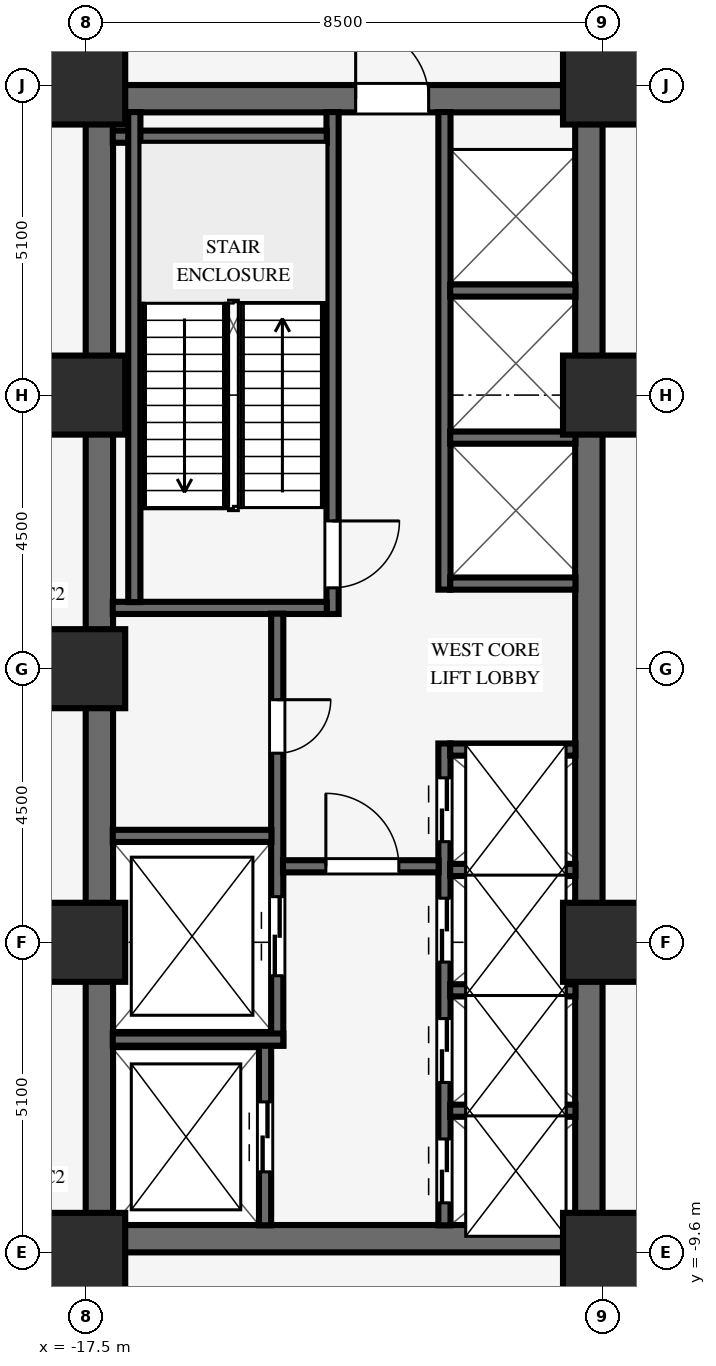
"""IFC4 building model, lengths in metres.
Left out: names, types, materials, properties, quantities, classifications, styles, units other than length and angle.
Written with IfcOpenShell. Run it as: python <this file> out.ifc"""

import sys

from ifc_helpers import new_model, si_unit, direction, frame, frame_2d, origin, origin_2d, place, context, subcontext, project, spatial, rectangle, extrude, source, transform, mapped, element, fill, save


model = new_model("IFC4")
c1 = context("Model", 3, precision=1e-05, world=origin(), true_north=direction((0.0, 1.0)))
c2 = subcontext(c1, "Body", "Model", "MODEL_VIEW")
j1 = project(units=[si_unit("LENGTHUNIT", "METRE"), si_unit("PLANEANGLEUNIT", "RADIAN")], contexts=[c1])
p1 = place(None, origin())
s1 = spatial("IfcSite", under=j1, at=p1, CompositionType="ELEMENT")
p2 = place(p1, origin())
s2 = spatial("IfcBuilding", under=s1, at=p2, CompositionType="ELEMENT")
p3 = place(p2, frame((0.0, 0.0, 9.2)))
s3 = spatial("IfcBuildingStorey", under=s2, at=p3, CompositionType="ELEMENT", Elevation=9.2)
p4 = place(p3, frame((-17.5, -9.375, 0.0), z_axis=(0.0, 0.0, 1.0), x_axis=(1.0, 0.0, 0.0)))
e1 = element("IfcWall", 1, at=p4, inside=s3, PredefinedType="SHEAR", context=c2, shape_type="SweptSolid", body=[
    extrude(rectangle(XDim=8.5, YDim=0.45, at=frame_2d((4.25, 0.0))), origin(), (0.0, 0.0, 1.0), 4.28),
])
p5 = place(p3, frame((-17.5, 9.375, 0.0), z_axis=(0.0, 0.0, 1.0), x_axis=(1.0, 0.0, 0.0)))
e2 = element("IfcWall", 2, at=p5, inside=s3, PredefinedType="SHEAR", context=c2, shape_type="SweptSolid", body=[
    extrude(rectangle(XDim=8.5, YDim=0.45, at=frame_2d((4.25, 0.0))), origin(), (0.0, 0.0, 1.0), 4.28),
])
p6 = place(p5, frame((4.44, 0.0, 0.0)))
e3 = element("IfcOpeningElement", 3, at=p6, cuts=e2, PredefinedType="OPENING", context=c2, shape_type="SweptSolid", body=[
    extrude(rectangle(XDim=1.2, YDim=2.15, at=frame_2d((0.6, 1.075))), frame((0.0, 0.235, 0.0), z_axis=(0.0, -1.0, 0.0), x_axis=(1.0, 0.0, 0.0)), (0.0, 0.0, 1.0), 0.47),
])
for number, where, z_axis, x_axis in (
    (4, (-17.275, -9.155, 0.0), (0.0, 0.0, 1.0), (0.0, 1.0, 0.0)),
    (5, (-9.225, -9.155, 0.0), (0.0, 0.0, 1.0), (0.0, 1.0, 0.0)),
):
    element("IfcWall", number, at=place(p3, frame(where, z_axis=z_axis, x_axis=x_axis)), inside=s3, PredefinedType="SHEAR", context=c2, shape_type="SweptSolid", body=[
        extrude(rectangle(XDim=18.31, YDim=0.45, at=frame_2d((9.155, 0.0))), origin(), (0.0, 0.0, 1.0), 4.28),
    ])
for number, where, z_axis, x_axis in (
    (6, (-17.5, -9.6, 0.0), (0.0, 0.0, 1.0), (1.0, 0.0, 0.0)),
    (7, (-17.5, -4.5, 0.0), (0.0, 0.0, 1.0), (1.0, 0.0, 0.0)),
    (8, (-17.5, 4.5, 0.0), (0.0, 0.0, 1.0), (1.0, 0.0, 0.0)),
    (9, (-17.5, 9.6, 0.0), (0.0, 0.0, 1.0), (1.0, 0.0, 0.0)),
    (10, (-9.0, -9.6, 0.0), (0.0, 0.0, 1.0), (1.0, 0.0, 0.0)),
    (11, (-9.0, -4.5, 0.0), (0.0, 0.0, 1.0), (1.0, 0.0, 0.0)),
    (12, (-9.0, 4.5, 0.0), (0.0, 0.0, 1.0), (1.0, 0.0, 0.0)),
    (13, (-9.0, 9.6, 0.0), (0.0, 0.0, 1.0), (1.0, 0.0, 0.0)),
    (14, (-17.5, 0.0, 0.0), (0.0, 0.0, 1.0), (1.0, 0.0, 0.0)),
):
    element("IfcColumn", number, at=place(p3, frame(where, z_axis=z_axis, x_axis=x_axis)), inside=s3, PredefinedType="COLUMN", context=c2, shape_type="SweptSolid", body=[
        extrude(rectangle(XDim=1.3, YDim=1.3, at=origin_2d()), origin(), (0.0, 0.0, 1.0), 4.28),
    ])
p7 = place(p3, frame((-13.44, 0.9, 0.0), z_axis=(0.0, 0.0, 1.0), x_axis=(0.0, 1.0, 0.0)))
e15 = element("IfcWall", 15, at=p7, inside=s3, PredefinedType="SHEAR", context=c2, shape_type="SweptSolid", body=[
    extrude(rectangle(XDim=8.255, YDim=0.2, at=frame_2d((4.127, 0.0))), origin(), (0.0, 0.0, 1.0), 4.28),
])
p8 = place(p7, frame((1.53, 0.0, 0.0), z_axis=(0.0, 0.0, 1.0), x_axis=(-1.0, 0.0, 0.0)))
e16 = element("IfcOpeningElement", 16, at=p8, cuts=e15, PredefinedType="OPENING", context=c2, shape_type="SweptSolid", body=[
    extrude(rectangle(XDim=1.1, YDim=2.15, at=frame_2d((0.55, 1.075))), frame((0.0, 0.11, 0.0), z_axis=(0.0, -1.0, 0.0), x_axis=(1.0, 0.0, 0.0)), (0.0, 0.0, 1.0), 0.22),
])
for number, where, z_axis, x_axis in (
    (17, (-17.055, 1.0, 0.0), (0.0, 0.0, 1.0), (1.0, 0.0, 0.0)),
    (18, (-17.055, 8.75, 0.0), (0.0, 0.0, 1.0), (1.0, 0.0, 0.0)),
):
    element("IfcWall", number, at=place(p3, frame(where, z_axis=z_axis, x_axis=x_axis)), inside=s3, PredefinedType="SHEAR", context=c2, shape_type="SweptSolid", body=[
        extrude(rectangle(XDim=3.52, YDim=0.2, at=frame_2d((1.76, 0.0))), origin(), (0.0, 0.0, 1.0), 4.28),
    ])
p9 = place(p3, frame((-16.7, 1.095, 0.0), z_axis=(0.0, 0.0, 1.0), x_axis=(0.0, 1.0, 0.0)))
e19 = element("IfcWall", 19, at=p9, inside=s3, PredefinedType="SHEAR", context=c2, shape_type="SweptSolid", body=[
    extrude(rectangle(XDim=8.06, YDim=0.2, at=frame_2d((4.03, 0.0))), origin(), (0.0, 0.0, 1.0), 4.28),
])
p10 = place(p3, frame((-14.55, -9.155, 0.0), z_axis=(0.0, 0.0, 1.0), x_axis=(0.0, 1.0, 0.0)))
e20 = element("IfcWall", 20, at=p10, inside=s3, PredefinedType="SHEAR", context=c2, shape_type="SweptSolid", body=[
    extrude(rectangle(XDim=2.96, YDim=0.2, at=frame_2d((1.48, 0.0))), origin(), (0.0, 0.0, 1.0), 4.28),
])
p11 = place(p10, frame((0.88, 0.0, 0.0)))
e21 = element("IfcOpeningElement", 21, at=p11, cuts=e20, PredefinedType="OPENING", context=c2, shape_type="SweptSolid", body=[
    extrude(rectangle(XDim=1.15, YDim=2.15, at=frame_2d((0.575, 1.075))), frame((0.0, 0.11, 0.0), z_axis=(0.0, -1.0, 0.0), x_axis=(1.0, 0.0, 0.0)), (0.0, 0.0, 1.0), 0.22),
])
p12 = place(p3, frame((-14.35, -6.2, 0.0), z_axis=(0.0, 0.0, 1.0), x_axis=(0.0, 1.0, 0.0)))
e22 = element("IfcWall", 22, at=p12, inside=s3, PredefinedType="SHEAR", context=c2, shape_type="SweptSolid", body=[
    extrude(rectangle(XDim=7.105, YDim=0.2, at=frame_2d((3.552, 0.0))), origin(), (0.0, 0.0, 1.0), 4.28),
])
p13 = place(p12, frame((5.69, 0.0, 0.0), z_axis=(0.0, 0.0, 1.0), x_axis=(-1.0, 0.0, 0.0)))
e23 = element("IfcOpeningElement", 23, at=p13, cuts=e22, PredefinedType="OPENING", context=c2, shape_type="SweptSolid", body=[
    extrude(rectangle(XDim=0.88, YDim=2.1, at=frame_2d((0.44, 1.05))), frame((0.0, 0.11, 0.0), z_axis=(0.0, -1.0, 0.0), x_axis=(1.0, 0.0, 0.0)), (0.0, 0.0, 1.0), 0.22),
])
p14 = place(p12, frame((1.15, 0.0, 0.0)))
e24 = element("IfcOpeningElement", 24, at=p14, cuts=e22, PredefinedType="OPENING", context=c2, shape_type="SweptSolid", body=[
    extrude(rectangle(XDim=1.3, YDim=2.2, at=frame_2d((0.65, 1.1))), frame((0.0, 0.11, 0.0), z_axis=(0.0, -1.0, 0.0), x_axis=(1.0, 0.0, 0.0)), (0.0, 0.0, 1.0), 0.22),
])
p15 = place(p3, frame((-17.055, -6.1, 0.0), z_axis=(0.0, 0.0, 1.0), x_axis=(1.0, 0.0, 0.0)))
e25 = element("IfcWall", 25, at=p15, inside=s3, PredefinedType="SHEAR", context=c2, shape_type="SweptSolid", body=[
    extrude(rectangle(XDim=2.805, YDim=0.2, at=frame_2d((1.402, 0.0))), origin(), (0.0, 0.0, 1.0), 4.28),
])
p16 = place(p3, frame((-17.055, -2.75, 0.0), z_axis=(0.0, 0.0, 1.0), x_axis=(1.0, 0.0, 0.0)))
e26 = element("IfcWall", 26, at=p16, inside=s3, PredefinedType="SHEAR", context=c2, shape_type="SweptSolid", body=[
    extrude(rectangle(XDim=2.61, YDim=0.2, at=frame_2d((1.305, 0.0))), origin(), (0.0, 0.0, 1.0), 4.28),
])
p17 = place(p3, frame((-11.6, -9.155, 0.0), z_axis=(0.0, 0.0, 1.0), x_axis=(0.0, 1.0, 0.0)))
e27 = element("IfcWall", 27, at=p17, inside=s3, PredefinedType="SHEAR", context=c2, shape_type="SweptSolid", body=[
    extrude(rectangle(XDim=7.925, YDim=0.2, at=frame_2d((3.962, 0.0))), origin(), (0.0, 0.0, 1.0), 4.28),
])
p18 = place(p17, frame((0.37, 0.0, 0.0)))
e28 = element("IfcOpeningElement", 28, at=p18, cuts=e27, PredefinedType="OPENING", context=c2, shape_type="SweptSolid", body=[
    extrude(rectangle(XDim=1.05, YDim=2.15, at=frame_2d((0.525, 1.075))), frame((0.0, 0.11, 0.0), z_axis=(0.0, -1.0, 0.0), x_axis=(1.0, 0.0, 0.0)), (0.0, 0.0, 1.0), 0.22),
])
p19 = place(p17, frame((2.35, 0.0, 0.0)))
e29 = element("IfcOpeningElement", 29, at=p19, cuts=e27, PredefinedType="OPENING", context=c2, shape_type="SweptSolid", body=[
    extrude(rectangle(XDim=1.05, YDim=2.15, at=frame_2d((0.525, 1.075))), frame((0.0, 0.11, 0.0), z_axis=(0.0, -1.0, 0.0), x_axis=(1.0, 0.0, 0.0)), (0.0, 0.0, 1.0), 0.22),
])
p20 = place(p17, frame((4.33, 0.0, 0.0)))
e30 = element("IfcOpeningElement", 30, at=p20, cuts=e27, PredefinedType="OPENING", context=c2, shape_type="SweptSolid", body=[
    extrude(rectangle(XDim=1.05, YDim=2.15, at=frame_2d((0.525, 1.075))), frame((0.0, 0.11, 0.0), z_axis=(0.0, -1.0, 0.0), x_axis=(1.0, 0.0, 0.0)), (0.0, 0.0, 1.0), 0.22),
])
p21 = place(p17, frame((6.31, 0.0, 0.0)))
e31 = element("IfcOpeningElement", 31, at=p21, cuts=e27, PredefinedType="OPENING", context=c2, shape_type="SweptSolid", body=[
    extrude(rectangle(XDim=1.05, YDim=2.15, at=frame_2d((0.525, 1.075))), frame((0.0, 0.11, 0.0), z_axis=(0.0, -1.0, 0.0), x_axis=(1.0, 0.0, 0.0)), (0.0, 0.0, 1.0), 0.22),
])
p22 = place(p3, frame((-14.255, -3.25, 0.0), z_axis=(0.0, 0.0, 1.0), x_axis=(1.0, 0.0, 0.0)))
e32 = element("IfcWall", 32, at=p22, inside=s3, PredefinedType="SHEAR", context=c2, shape_type="SweptSolid", body=[
    extrude(rectangle(XDim=2.56, YDim=0.2, at=frame_2d((1.28, 0.0))), origin(), (0.0, 0.0, 1.0), 4.28),
])
p23 = place(p22, frame((0.705, 0.0, 0.0)))
e33 = element("IfcOpeningElement", 33, at=p23, cuts=e32, PredefinedType="OPENING", context=c2, shape_type="SweptSolid", body=[
    extrude(rectangle(XDim=1.2, YDim=2.15, at=frame_2d((0.6, 1.075))), frame((0.0, 0.11, 0.0), z_axis=(0.0, -1.0, 0.0), x_axis=(1.0, 0.0, 0.0)), (0.0, 0.0, 1.0), 0.22),
])
for number, where, z_axis, x_axis in (
    (34, (-11.505, -7.27, 0.0), (0.0, 0.0, 1.0), (1.0, 0.0, 0.0)),
    (35, (-11.505, -5.29, 0.0), (0.0, 0.0, 1.0), (1.0, 0.0, 0.0)),
    (36, (-11.505, -3.31, 0.0), (0.0, 0.0, 1.0), (1.0, 0.0, 0.0)),
    (37, (-11.505, -1.33, 0.0), (0.0, 0.0, 1.0), (1.0, 0.0, 0.0)),
):
    element("IfcWall", number, at=place(p3, frame(where, z_axis=z_axis, x_axis=x_axis)), inside=s3, PredefinedType="SHEAR", context=c2, shape_type="SweptSolid", body=[
        extrude(rectangle(XDim=2.06, YDim=0.2, at=frame_2d((1.03, 0.0))), origin(), (0.0, 0.0, 1.0), 4.28),
    ])
p24 = place(p3, frame((-11.6, 1.3, 0.0), z_axis=(0.0, 0.0, 1.0), x_axis=(0.0, 1.0, 0.0)))
e38 = element("IfcWall", 38, at=p24, inside=s3, PredefinedType="SHEAR", context=c2, shape_type="SweptSolid", body=[
    extrude(rectangle(XDim=7.855, YDim=0.2, at=frame_2d((3.927, 0.0))), origin(), (0.0, 0.0, 1.0), 4.28),
])
for number, where, z_axis, x_axis in (
    (39, (-11.505, 1.4, 0.0), (0.0, 0.0, 1.0), (1.0, 0.0, 0.0)),
    (40, (-11.505, 3.8, 0.0), (0.0, 0.0, 1.0), (1.0, 0.0, 0.0)),
    (41, (-11.505, 6.22, 0.0), (0.0, 0.0, 1.0), (1.0, 0.0, 0.0)),
):
    element("IfcWall", number, at=place(p3, frame(where, z_axis=z_axis, x_axis=x_axis)), inside=s3, PredefinedType="SHEAR", context=c2, shape_type="SweptSolid", body=[
        extrude(rectangle(XDim=2.06, YDim=0.2, at=frame_2d((1.03, 0.0))), origin(), (0.0, 0.0, 1.0), 4.28),
    ])
m1 = source(origin(), c2, "Body", "SweptSolid", [
    extrude(rectangle(XDim=1.1, YDim=2.15, at=frame_2d((0.55, 1.075))), frame((0.0, 0.025, 0.0), z_axis=(0.0, -1.0, 0.0), x_axis=(1.0, 0.0, 0.0)), (0.0, 0.0, 1.0), 0.05),
])
p25 = place(p8, origin())
e42 = element("IfcDoor", 42, at=p25, inside=s3, OperationType="SINGLE_SWING_LEFT", PredefinedType="DOOR", context=c2, shape_type="MappedRepresentation", body=[
    mapped(m1, transform((0.0, 0.0, 0.0), scale=1.0)),
])
fill(e16, e42)
m2 = source(origin(), c2, "Body", "SweptSolid", [
    extrude(rectangle(XDim=0.88, YDim=2.1, at=frame_2d((0.44, 1.05))), frame((0.0, 0.025, 0.0), z_axis=(0.0, -1.0, 0.0), x_axis=(1.0, 0.0, 0.0)), (0.0, 0.0, 1.0), 0.05),
])
p26 = place(p13, origin())
e43 = element("IfcDoor", 43, at=p26, inside=s3, OperationType="SINGLE_SWING_LEFT", PredefinedType="DOOR", context=c2, shape_type="MappedRepresentation", body=[
    mapped(m2, transform((0.0, 0.0, 0.0), scale=1.0)),
])
fill(e23, e43)
m3 = source(origin(), c2, "Body", "SweptSolid", [
    extrude(rectangle(XDim=1.2, YDim=2.15, at=frame_2d((0.6, 1.075))), frame((0.0, 0.025, 0.0), z_axis=(0.0, -1.0, 0.0), x_axis=(1.0, 0.0, 0.0)), (0.0, 0.0, 1.0), 0.05),
])
p27 = place(p23, origin())
e44 = element("IfcDoor", 44, at=p27, inside=s3, OperationType="SINGLE_SWING_LEFT", PredefinedType="DOOR", context=c2, shape_type="MappedRepresentation", body=[
    mapped(m3, transform((0.0, 0.0, 0.0), scale=1.0)),
])
fill(e33, e44)
p28 = place(p6, origin())
e45 = element("IfcDoor", 45, at=p28, inside=s3, OperationType="SINGLE_SWING_LEFT", PredefinedType="DOOR", context=c2, shape_type="MappedRepresentation", body=[
    mapped(m3, transform((0.0, 0.0, 0.0), scale=1.0)),
])
fill(e3, e45)
m4 = source(origin(), c2, "Body", "SweptSolid", [
    extrude(rectangle(XDim=1.15, YDim=2.15, at=frame_2d((0.575, 1.075))), frame((0.0, 0.025, 0.0), z_axis=(0.0, -1.0, 0.0), x_axis=(1.0, 0.0, 0.0)), (0.0, 0.0, 1.0), 0.05),
])
p29 = place(p11, origin())
e46 = element("IfcDoor", 46, at=p29, inside=s3, OperationType="DOUBLE_DOOR_SLIDING", PredefinedType="DOOR", context=c2, shape_type="MappedRepresentation", body=[
    mapped(m4, transform((0.0, 0.0, 0.0), scale=1.0)),
])
fill(e21, e46)
m5 = source(origin(), c2, "Body", "SweptSolid", [
    extrude(rectangle(XDim=1.3, YDim=2.2, at=frame_2d((0.65, 1.1))), frame((0.0, 0.025, 0.0), z_axis=(0.0, -1.0, 0.0), x_axis=(1.0, 0.0, 0.0)), (0.0, 0.0, 1.0), 0.05),
])
p30 = place(p14, origin())
e47 = element("IfcDoor", 47, at=p30, inside=s3, OperationType="DOUBLE_DOOR_SLIDING", PredefinedType="DOOR", context=c2, shape_type="MappedRepresentation", body=[
    mapped(m5, transform((0.0, 0.0, 0.0), scale=1.0)),
])
fill(e24, e47)
m6 = source(origin(), c2, "Body", "SweptSolid", [
    extrude(rectangle(XDim=1.05, YDim=2.15, at=frame_2d((0.525, 1.075))), frame((0.0, 0.025, 0.0), z_axis=(0.0, -1.0, 0.0), x_axis=(1.0, 0.0, 0.0)), (0.0, 0.0, 1.0), 0.05),
])
p31 = place(p18, origin())
e48 = element("IfcDoor", 48, at=p31, inside=s3, OperationType="DOUBLE_DOOR_SLIDING", PredefinedType="DOOR", context=c2, shape_type="MappedRepresentation", body=[
    mapped(m6, transform((0.0, 0.0, 0.0), scale=1.0)),
])
fill(e28, e48)
p32 = place(p19, origin())
e49 = element("IfcDoor", 49, at=p32, inside=s3, OperationType="DOUBLE_DOOR_SLIDING", PredefinedType="DOOR", context=c2, shape_type="MappedRepresentation", body=[
    mapped(m6, transform((0.0, 0.0, 0.0), scale=1.0)),
])
fill(e29, e49)
p33 = place(p20, origin())
e50 = element("IfcDoor", 50, at=p33, inside=s3, OperationType="DOUBLE_DOOR_SLIDING", PredefinedType="DOOR", context=c2, shape_type="MappedRepresentation", body=[
    mapped(m6, transform((0.0, 0.0, 0.0), scale=1.0)),
])
fill(e30, e50)
p34 = place(p21, origin())
e51 = element("IfcDoor", 51, at=p34, inside=s3, OperationType="DOUBLE_DOOR_SLIDING", PredefinedType="DOOR", context=c2, shape_type="MappedRepresentation", body=[
    mapped(m6, transform((0.0, 0.0, 0.0), scale=1.0)),
])
fill(e31, e51)
save(model, sys.argv[1])
